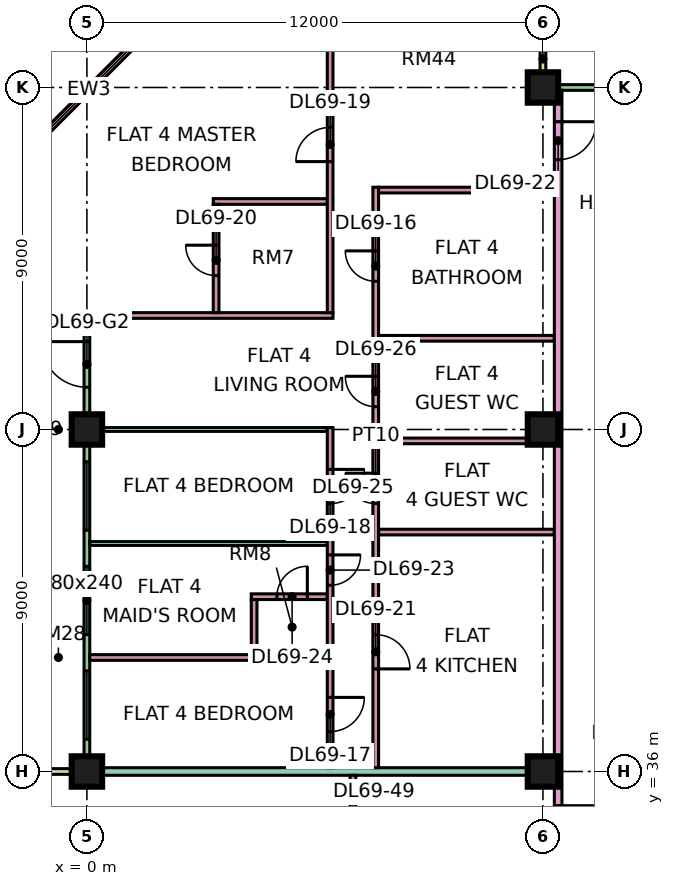
"""IFC4 building model, lengths in metres.
Left out: names, types, materials, properties, quantities, classifications, styles, units other than length and angle.
Written with IfcOpenShell. Run it as: python <this file> out.ifc"""

import sys

from ifc_helpers import new_model, si_unit, direction, frame, frame_2d, origin, origin_2d, place, context, subcontext, project, spatial, rectangle, extrude, element, fill, save


model = new_model("IFC4")
c1 = context("Model", 3, precision=1e-05, world=origin(), true_north=direction((0.0, 1.0)))
c2 = subcontext(c1, "Body", "Model", "MODEL_VIEW")
j1 = project(units=[si_unit("LENGTHUNIT", "METRE"), si_unit("PLANEANGLEUNIT", "RADIAN")], contexts=[c1])
p1 = place(None, origin())
s1 = spatial("IfcSite", under=j1, at=p1, CompositionType="ELEMENT")
p2 = place(p1, origin())
s2 = spatial("IfcBuilding", under=s1, at=p2, CompositionType="ELEMENT")
p3 = place(p2, frame((0.0, 0.0, 295.9)))
s3 = spatial("IfcBuildingStorey", under=s2, at=p3, CompositionType="ELEMENT", Elevation=295.9)
p4 = place(p3, frame((0.0, 36.0, 0.0), z_axis=(0.0, 0.0, 1.0), x_axis=(1.0, 0.0, 0.0)))
e1 = element("IfcColumn", 1, at=p4, inside=s3, PredefinedType="COLUMN", context=c2, shape_type="SweptSolid", body=[
    extrude(rectangle(XDim=0.8, YDim=0.8, at=origin_2d()), origin(), (0.0, 0.0, 1.0), 3.75),
])
for number, where, z_axis, x_axis in (
    (2, (0.0, 45.0, 0.0), (0.0, 0.0, 1.0), (1.0, 0.0, 0.0)),
    (3, (12.0, 36.0, 0.0), (0.0, 0.0, 1.0), (1.0, 0.0, 0.0)),
    (4, (12.0, 45.0, 0.0), (0.0, 0.0, 1.0), (1.0, 0.0, 0.0)),
    (5, (12.0, 54.0, 0.0), (0.0, 0.0, 1.0), (1.0, 0.0, 0.0)),
):
    element("IfcColumn", number, at=place(p3, frame(where, z_axis=z_axis, x_axis=x_axis)), inside=s3, PredefinedType="COLUMN", context=c2, shape_type="SweptSolid", body=[
        extrude(rectangle(XDim=0.8, YDim=0.8, at=origin_2d()), origin(), (0.0, 0.0, 1.0), 3.75),
    ])
p5 = place(p3, frame((22.425, 54.0, 0.0), z_axis=(0.0, 0.0, 1.0), x_axis=(-1.0, 0.0, 0.0)))
e6 = element("IfcWall", 6, at=p5, inside=s3, PredefinedType="SOLIDWALL", context=c2, shape_type="SweptSolid", body=[
    extrude(rectangle(XDim=10.35, YDim=0.15, at=frame_2d((5.175, 0.0))), origin(), (0.0, 0.0, 1.0), 3.35),
])
p6 = place(p5, frame((1.012, 0.0, 0.45)))
e7 = element("IfcOpeningElement", 7, at=p6, cuts=e6, PredefinedType="OPENING", context=c2, shape_type="SweptSolid", body=[
    extrude(rectangle(XDim=4.8, YDim=2.4, at=frame_2d((2.4, 1.2))), frame((0.0, 0.085, 0.0), z_axis=(0.0, -1.0, 0.0), x_axis=(1.0, 0.0, 0.0)), (0.0, 0.0, 1.0), 0.17),
])
p7 = place(p3, frame((12.0, 55.5, 0.0), z_axis=(0.0, 0.0, 1.0), x_axis=(0.0, -1.0, 0.0)))
e8 = element("IfcWall", 8, at=p7, inside=s3, PredefinedType="SOLIDWALL", context=c2, shape_type="SweptSolid", body=[
    extrude(rectangle(XDim=1.5, YDim=0.15, at=frame_2d((0.75, 0.0))), origin(), (0.0, 0.0, 1.0), 3.35),
])
p8 = place(p3, frame((1.553, 55.447, 0.0), z_axis=(0.0, 0.0, 1.0), x_axis=(-0.707106781187, -0.707106781187, 0.0)))
e9 = element("IfcWall", 9, at=p8, inside=s3, PredefinedType="SOLIDWALL", context=c2, shape_type="SweptSolid", body=[
    extrude(rectangle(XDim=4.243, YDim=0.15, at=frame_2d((2.121, 0.0))), origin(), (0.0, 0.0, 1.0), 3.35),
])
p9 = place(p8, frame((0.621, 0.0, 0.45)))
e10 = element("IfcOpeningElement", 10, at=p9, cuts=e9, PredefinedType="OPENING", context=c2, shape_type="SweptSolid", body=[
    extrude(rectangle(XDim=3.0, YDim=2.4, at=frame_2d((1.5, 1.2))), frame((0.0, 0.085, 0.0), z_axis=(0.0, -1.0, 0.0), x_axis=(1.0, 0.0, 0.0)), (0.0, 0.0, 1.0), 0.17),
])
p10 = place(p3, frame((0.0, 47.925, 0.0), z_axis=(0.0, 0.0, 1.0), x_axis=(0.0, -1.0, 0.0)))
e11 = element("IfcWall", 11, at=p10, inside=s3, PredefinedType="SOLIDWALL", context=c2, shape_type="SweptSolid", body=[
    extrude(rectangle(XDim=11.85, YDim=0.15, at=frame_2d((5.925, 0.0))), origin(), (0.0, 0.0, 1.0), 3.35),
])
p11 = place(p10, frame((0.613, 0.0, 0.0)))
e12 = element("IfcOpeningElement", 12, at=p11, cuts=e11, PredefinedType="OPENING", context=c2, shape_type="SweptSolid", body=[
    extrude(rectangle(XDim=1.2, YDim=2.4, at=frame_2d((0.6, 1.2))), frame((0.0, 0.085, 0.0), z_axis=(0.0, -1.0, 0.0), x_axis=(1.0, 0.0, 0.0)), (0.0, 0.0, 1.0), 0.17),
])
p12 = place(p10, frame((3.775, 0.0, 0.45)))
e13 = element("IfcOpeningElement", 13, at=p12, cuts=e11, PredefinedType="OPENING", context=c2, shape_type="SweptSolid", body=[
    extrude(rectangle(XDim=1.8, YDim=2.4, at=frame_2d((0.9, 1.2))), frame((0.0, 0.085, 0.0), z_axis=(0.0, -1.0, 0.0), x_axis=(1.0, 0.0, 0.0)), (0.0, 0.0, 1.0), 0.17),
])
p13 = place(p10, frame((6.525, 0.0, 0.45)))
e14 = element("IfcOpeningElement", 14, at=p13, cuts=e11, PredefinedType="OPENING", context=c2, shape_type="SweptSolid", body=[
    extrude(rectangle(XDim=1.8, YDim=2.4, at=frame_2d((0.9, 1.2))), frame((0.0, 0.085, 0.0), z_axis=(0.0, -1.0, 0.0), x_axis=(1.0, 0.0, 0.0)), (0.0, 0.0, 1.0), 0.17),
])
p14 = place(p10, frame((9.275, 0.0, 0.45)))
e15 = element("IfcOpeningElement", 15, at=p14, cuts=e11, PredefinedType="OPENING", context=c2, shape_type="SweptSolid", body=[
    extrude(rectangle(XDim=1.8, YDim=2.4, at=frame_2d((0.9, 1.2))), frame((0.0, 0.085, 0.0), z_axis=(0.0, -1.0, 0.0), x_axis=(1.0, 0.0, 0.0)), (0.0, 0.0, 1.0), 0.17),
])
for number, where, z_axis, x_axis in (
    (16, (-1.5, 48.0, 0.0), (0.0, 0.0, 1.0), (1.0, 0.0, 0.0)),
    (17, (-1.5, 36.0, 0.0), (0.0, 0.0, 1.0), (1.0, 0.0, 0.0)),
):
    element("IfcWall", number, at=place(p3, frame(where, z_axis=z_axis, x_axis=x_axis)), inside=s3, PredefinedType="SOLIDWALL", context=c2, shape_type="SweptSolid", body=[
        extrude(rectangle(XDim=1.5, YDim=0.15, at=frame_2d((0.75, 0.0))), origin(), (0.0, 0.0, 1.0), 3.35),
    ])
e18 = element("IfcWall", 18, at=p4, inside=s3, PredefinedType="PARTITIONING", context=c2, shape_type="SweptSolid", body=[
    extrude(rectangle(XDim=12.3, YDim=0.2, at=frame_2d((6.15, 0.0))), origin(), (0.0, 0.0, 1.0), 3.35),
])
p15 = place(p3, frame((0.0, 48.0, 0.0), z_axis=(0.0, 0.0, 1.0), x_axis=(1.0, 0.0, 0.0)))
e19 = element("IfcWall", 19, at=p15, inside=s3, PredefinedType="PARTITIONING", context=c2, shape_type="SweptSolid", body=[
    extrude(rectangle(XDim=6.475, YDim=0.15, at=frame_2d((3.238, 0.0))), origin(), (0.0, 0.0, 1.0), 3.35),
])
p16 = place(p3, frame((0.074, 39.0, 0.0), z_axis=(0.0, 0.0, 1.0), x_axis=(1.0, 0.0, 0.0)))
e20 = element("IfcWall", 20, at=p16, inside=s3, PredefinedType="PARTITIONING", context=c2, shape_type="SweptSolid", body=[
    extrude(rectangle(XDim=6.251, YDim=0.15, at=frame_2d((3.125, 0.0))), origin(), (0.0, 0.0, 1.0), 3.35),
])
for number, where, z_axis, x_axis in (
    (21, (0.074, 42.0, 0.0), (0.0, 0.0, 1.0), (1.0, 0.0, 0.0)),
    (22, (0.074, 45.0, 0.0), (0.0, 0.0, 1.0), (1.0, 0.0, 0.0)),
):
    element("IfcWall", number, at=place(p3, frame(where, z_axis=z_axis, x_axis=x_axis)), inside=s3, PredefinedType="PARTITIONING", context=c2, shape_type="SweptSolid", body=[
        extrude(rectangle(XDim=6.251, YDim=0.1, at=frame_2d((3.125, 0.0))), origin(), (0.0, 0.0, 1.0), 3.35),
    ])
p17 = place(p3, frame((3.325, 51.0, 0.0), z_axis=(0.0, 0.0, 1.0), x_axis=(1.0, 0.0, 0.0)))
e23 = element("IfcWall", 23, at=p17, inside=s3, PredefinedType="PARTITIONING", context=c2, shape_type="SweptSolid", body=[
    extrude(rectangle(XDim=3.0, YDim=0.15, at=frame_2d((1.5, 0.0))), origin(), (0.0, 0.0, 1.0), 3.35),
])
p18 = place(p3, frame((3.4, 48.075, 0.0), z_axis=(0.0, 0.0, 1.0), x_axis=(0.0, 1.0, 0.0)))
e24 = element("IfcWall", 24, at=p18, inside=s3, PredefinedType="PARTITIONING", context=c2, shape_type="SweptSolid", body=[
    extrude(rectangle(XDim=2.85, YDim=0.15, at=frame_2d((1.425, 0.0))), origin(), (0.0, 0.0, 1.0), 3.35),
])
p19 = place(p18, frame((0.975, 0.0, 0.0)))
e25 = element("IfcOpeningElement", 25, at=p19, cuts=e24, PredefinedType="OPENING", context=c2, shape_type="SweptSolid", body=[
    extrude(rectangle(XDim=0.8, YDim=2.1, at=frame_2d((0.4, 1.05))), frame((0.0, 0.085, 0.0), z_axis=(0.0, -1.0, 0.0), x_axis=(1.0, 0.0, 0.0)), (0.0, 0.0, 1.0), 0.17),
])
p20 = place(p3, frame((4.325, 40.6, 0.0), z_axis=(0.0, 0.0, 1.0), x_axis=(1.0, 0.0, 0.0)))
e26 = element("IfcWall", 26, at=p20, inside=s3, PredefinedType="PARTITIONING", context=c2, shape_type="SweptSolid", body=[
    extrude(rectangle(XDim=2.0, YDim=0.15, at=frame_2d((1.0, 0.0))), origin(), (0.0, 0.0, 1.0), 3.35),
])
p21 = place(p20, frame((0.675, 0.0, 0.0)))
e27 = element("IfcOpeningElement", 27, at=p21, cuts=e26, PredefinedType="OPENING", context=c2, shape_type="SweptSolid", body=[
    extrude(rectangle(XDim=0.8, YDim=2.1, at=frame_2d((0.4, 1.05))), frame((0.0, 0.085, 0.0), z_axis=(0.0, -1.0, 0.0), x_axis=(1.0, 0.0, 0.0)), (0.0, 0.0, 1.0), 0.17),
])
p22 = place(p3, frame((4.4, 39.075, 0.0), z_axis=(0.0, 0.0, 1.0), x_axis=(0.0, 1.0, 0.0)))
e28 = element("IfcWall", 28, at=p22, inside=s3, PredefinedType="PARTITIONING", context=c2, shape_type="SweptSolid", body=[
    extrude(rectangle(XDim=1.45, YDim=0.15, at=frame_2d((0.725, 0.0))), origin(), (0.0, 0.0, 1.0), 3.35),
])
p23 = place(p3, frame((6.4, 36.1, 0.0), z_axis=(0.0, 0.0, 1.0), x_axis=(0.0, 1.0, 0.0)))
e29 = element("IfcWall", 29, at=p23, inside=s3, PredefinedType="PARTITIONING", context=c2, shape_type="SweptSolid", body=[
    extrude(rectangle(XDim=8.95, YDim=0.15, at=frame_2d((4.475, 0.0))), origin(), (0.0, 0.0, 1.0), 3.35),
])
p24 = place(p23, frame((0.95, 0.0, 0.0)))
e30 = element("IfcOpeningElement", 30, at=p24, cuts=e29, PredefinedType="OPENING", context=c2, shape_type="SweptSolid", body=[
    extrude(rectangle(XDim=0.9, YDim=2.1, at=frame_2d((0.45, 1.05))), frame((0.0, 0.085, 0.0), z_axis=(0.0, -1.0, 0.0), x_axis=(1.0, 0.0, 0.0)), (0.0, 0.0, 1.0), 0.17),
])
p25 = place(p23, frame((6.95, 0.0, 0.0)))
e31 = element("IfcOpeningElement", 31, at=p25, cuts=e29, PredefinedType="OPENING", context=c2, shape_type="SweptSolid", body=[
    extrude(rectangle(XDim=0.9, YDim=2.1, at=frame_2d((0.45, 1.05))), frame((0.0, 0.085, 0.0), z_axis=(0.0, -1.0, 0.0), x_axis=(1.0, 0.0, 0.0)), (0.0, 0.0, 1.0), 0.17),
])
p26 = place(p23, frame((4.8, 0.0, 0.0)))
e32 = element("IfcOpeningElement", 32, at=p26, cuts=e29, PredefinedType="OPENING", context=c2, shape_type="SweptSolid", body=[
    extrude(rectangle(XDim=0.8, YDim=2.1, at=frame_2d((0.4, 1.05))), frame((0.0, 0.085, 0.0), z_axis=(0.0, -1.0, 0.0), x_axis=(1.0, 0.0, 0.0)), (0.0, 0.0, 1.0), 0.17),
])
p27 = place(p3, frame((6.4, 48.075, 0.0), z_axis=(0.0, 0.0, 1.0), x_axis=(0.0, 1.0, 0.0)))
e33 = element("IfcWall", 33, at=p27, inside=s3, PredefinedType="PARTITIONING", context=c2, shape_type="SweptSolid", body=[
    extrude(rectangle(XDim=7.275, YDim=0.15, at=frame_2d((3.638, 0.0))), origin(), (0.0, 0.0, 1.0), 3.35),
])
p28 = place(p27, frame((3.975, 0.0, 0.0)))
e34 = element("IfcOpeningElement", 34, at=p28, cuts=e33, PredefinedType="OPENING", context=c2, shape_type="SweptSolid", body=[
    extrude(rectangle(XDim=0.9, YDim=2.1, at=frame_2d((0.45, 1.05))), frame((0.0, 0.085, 0.0), z_axis=(0.0, -1.0, 0.0), x_axis=(1.0, 0.0, 0.0)), (0.0, 0.0, 1.0), 0.17),
])
p29 = place(p3, frame((7.0, 30.075, 0.0), z_axis=(0.0, 0.0, 1.0), x_axis=(0.0, 1.0, 0.0)))
e35 = element("IfcWall", 35, at=p29, inside=s3, PredefinedType="PARTITIONING", context=c2, shape_type="SweptSolid", body=[
    extrude(rectangle(XDim=5.825, YDim=0.15, at=frame_2d((2.913, 0.0))), origin(), (0.0, 0.0, 1.0), 3.35),
])
p30 = place(p29, frame((3.975, 0.0, 0.0)))
e36 = element("IfcOpeningElement", 36, at=p30, cuts=e35, PredefinedType="OPENING", context=c2, shape_type="SweptSolid", body=[
    extrude(rectangle(XDim=0.9, YDim=2.1, at=frame_2d((0.45, 1.05))), frame((0.0, 0.085, 0.0), z_axis=(0.0, -1.0, 0.0), x_axis=(1.0, 0.0, 0.0)), (0.0, 0.0, 1.0), 0.17),
])
p31 = place(p3, frame((7.6, 36.1, 0.0), z_axis=(0.0, 0.0, 1.0), x_axis=(0.0, 1.0, 0.0)))
e37 = element("IfcWall", 37, at=p31, inside=s3, PredefinedType="PARTITIONING", context=c2, shape_type="SweptSolid", body=[
    extrude(rectangle(XDim=15.275, YDim=0.15, at=frame_2d((7.637, 0.0))), origin(), (0.0, 0.0, 1.0), 3.35),
])
p32 = place(p31, frame((12.8, 0.0, 0.0)))
e38 = element("IfcOpeningElement", 38, at=p32, cuts=e37, PredefinedType="OPENING", context=c2, shape_type="SweptSolid", body=[
    extrude(rectangle(XDim=0.8, YDim=2.1, at=frame_2d((0.4, 1.05))), frame((0.0, 0.085, 0.0), z_axis=(0.0, -1.0, 0.0), x_axis=(1.0, 0.0, 0.0)), (0.0, 0.0, 1.0), 0.17),
])
p33 = place(p31, frame((2.6, 0.0, 0.0)))
e39 = element("IfcOpeningElement", 39, at=p33, cuts=e37, PredefinedType="OPENING", context=c2, shape_type="SweptSolid", body=[
    extrude(rectangle(XDim=0.9, YDim=2.1, at=frame_2d((0.45, 1.05))), frame((0.0, 0.085, 0.0), z_axis=(0.0, -1.0, 0.0), x_axis=(1.0, 0.0, 0.0)), (0.0, 0.0, 1.0), 0.17),
])
p34 = place(p31, frame((6.95, 0.0, 0.0)))
e40 = element("IfcOpeningElement", 40, at=p34, cuts=e37, PredefinedType="OPENING", context=c2, shape_type="SweptSolid", body=[
    extrude(rectangle(XDim=0.8, YDim=2.1, at=frame_2d((0.4, 1.05))), frame((0.0, 0.085, 0.0), z_axis=(0.0, -1.0, 0.0), x_axis=(1.0, 0.0, 0.0)), (0.0, 0.0, 1.0), 0.17),
])
p35 = place(p31, frame((9.5, 0.0, 0.0)))
e41 = element("IfcOpeningElement", 41, at=p35, cuts=e37, PredefinedType="OPENING", context=c2, shape_type="SweptSolid", body=[
    extrude(rectangle(XDim=0.8, YDim=2.1, at=frame_2d((0.4, 1.05))), frame((0.0, 0.085, 0.0), z_axis=(0.0, -1.0, 0.0), x_axis=(1.0, 0.0, 0.0)), (0.0, 0.0, 1.0), 0.17),
])
for number, where, z_axis, x_axis in (
    (42, (7.675, 42.3, 0.0), (0.0, 0.0, 1.0), (1.0, 0.0, 0.0)),
    (43, (7.675, 44.7, 0.0), (0.0, 0.0, 1.0), (1.0, 0.0, 0.0)),
    (44, (7.675, 47.4, 0.0), (0.0, 0.0, 1.0), (1.0, 0.0, 0.0)),
    (45, (7.675, 51.3, 0.0), (0.0, 0.0, 1.0), (1.0, 0.0, 0.0)),
):
    element("IfcWall", number, at=place(p3, frame(where, z_axis=z_axis, x_axis=x_axis)), inside=s3, PredefinedType="PARTITIONING", context=c2, shape_type="SweptSolid", body=[
        extrude(rectangle(XDim=4.625, YDim=0.15, at=frame_2d((2.312, 0.0))), origin(), (0.0, 0.0, 1.0), 3.35),
    ])
p36 = place(p3, frame((12.4, 20.0, 0.0), z_axis=(0.0, 0.0, 1.0), x_axis=(0.0, 1.0, 0.0)))
e46 = element("IfcWall", 46, at=p36, inside=s3, PredefinedType="PARTITIONING", context=c2, shape_type="SweptSolid", body=[
    extrude(rectangle(XDim=33.926, YDim=0.2, at=frame_2d((16.963, 0.0))), origin(), (0.0, 0.0, 1.0), 3.35),
])
p37 = place(p36, frame((32.1, 0.0, 0.0)))
e47 = element("IfcOpeningElement", 47, at=p37, cuts=e46, PredefinedType="OPENING", context=c2, shape_type="SweptSolid", body=[
    extrude(rectangle(XDim=1.0, YDim=2.1, at=frame_2d((0.5, 1.05))), frame((0.0, 0.11, 0.0), z_axis=(0.0, -1.0, 0.0), x_axis=(1.0, 0.0, 0.0)), (0.0, 0.0, 1.0), 0.22),
])
p38 = place(p36, frame((0.6, 0.0, 0.0)))
e48 = element("IfcOpeningElement", 48, at=p38, cuts=e46, PredefinedType="OPENING", context=c2, shape_type="SweptSolid", body=[
    extrude(rectangle(XDim=1.2, YDim=2.1, at=frame_2d((0.6, 1.05))), frame((0.0, 0.11, 0.0), z_axis=(0.0, -1.0, 0.0), x_axis=(1.0, 0.0, 0.0)), (0.0, 0.0, 1.0), 0.22),
])
p39 = place(p36, frame((14.1, 0.0, 0.0)))
e49 = element("IfcOpeningElement", 49, at=p39, cuts=e46, PredefinedType="OPENING", context=c2, shape_type="SweptSolid", body=[
    extrude(rectangle(XDim=1.0, YDim=2.1, at=frame_2d((0.5, 1.05))), frame((0.0, 0.11, 0.0), z_axis=(0.0, -1.0, 0.0), x_axis=(1.0, 0.0, 0.0)), (0.0, 0.0, 1.0), 0.22),
])
p40 = place(p9, origin())
e50 = element("IfcWindow", 50, at=p40, inside=s3, PartitioningType="SINGLE_PANEL", PredefinedType="WINDOW", context=c2, shape_type="SweptSolid", body=[
    extrude(rectangle(XDim=3.0, YDim=2.4, at=frame_2d((1.5, 1.2))), frame((0.0, 0.03, 0.0), z_axis=(0.0, -1.0, 0.0), x_axis=(1.0, 0.0, 0.0)), (0.0, 0.0, 1.0), 0.06),
])
fill(e10, e50)
p41 = place(p11, frame((1.2, 0.0, 0.0), z_axis=(0.0, 0.0, 1.0), x_axis=(-1.0, 0.0, 0.0)))
e51 = element("IfcDoor", 51, at=p41, inside=s3, OperationType="DOUBLE_DOOR_SINGLE_SWING", PredefinedType="DOOR", context=c2, shape_type="SweptSolid", body=[
    extrude(rectangle(XDim=1.2, YDim=2.4, at=frame_2d((0.6, 1.2))), frame((0.0, 0.025, 0.0), z_axis=(0.0, -1.0, 0.0), x_axis=(1.0, 0.0, 0.0)), (0.0, 0.0, 1.0), 0.05),
])
fill(e12, e51)
p42 = place(p12, origin())
e52 = element("IfcWindow", 52, at=p42, inside=s3, PartitioningType="SINGLE_PANEL", PredefinedType="WINDOW", context=c2, shape_type="SweptSolid", body=[
    extrude(rectangle(XDim=1.8, YDim=2.4, at=frame_2d((0.9, 1.2))), frame((0.0, 0.03, 0.0), z_axis=(0.0, -1.0, 0.0), x_axis=(1.0, 0.0, 0.0)), (0.0, 0.0, 1.0), 0.06),
])
fill(e13, e52)
p43 = place(p13, origin())
e53 = element("IfcWindow", 53, at=p43, inside=s3, PartitioningType="SINGLE_PANEL", PredefinedType="WINDOW", context=c2, shape_type="SweptSolid", body=[
    extrude(rectangle(XDim=1.8, YDim=2.4, at=frame_2d((0.9, 1.2))), frame((0.0, 0.03, 0.0), z_axis=(0.0, -1.0, 0.0), x_axis=(1.0, 0.0, 0.0)), (0.0, 0.0, 1.0), 0.06),
])
fill(e14, e53)
p44 = place(p14, origin())
e54 = element("IfcWindow", 54, at=p44, inside=s3, PartitioningType="SINGLE_PANEL", PredefinedType="WINDOW", context=c2, shape_type="SweptSolid", body=[
    extrude(rectangle(XDim=1.8, YDim=2.4, at=frame_2d((0.9, 1.2))), frame((0.0, 0.03, 0.0), z_axis=(0.0, -1.0, 0.0), x_axis=(1.0, 0.0, 0.0)), (0.0, 0.0, 1.0), 0.06),
])
fill(e15, e54)
p45 = place(p32, frame((0.8, 0.0, 0.0), z_axis=(0.0, 0.0, 1.0), x_axis=(-1.0, 0.0, 0.0)))
e55 = element("IfcDoor", 55, at=p45, inside=s3, OperationType="SINGLE_SWING_RIGHT", PredefinedType="DOOR", context=c2, shape_type="SweptSolid", body=[
    extrude(rectangle(XDim=0.8, YDim=2.1, at=frame_2d((0.4, 1.05))), frame((0.0, 0.025, 0.0), z_axis=(0.0, -1.0, 0.0), x_axis=(1.0, 0.0, 0.0)), (0.0, 0.0, 1.0), 0.05),
])
fill(e38, e55)
p46 = place(p24, origin())
e56 = element("IfcDoor", 56, at=p46, inside=s3, OperationType="SINGLE_SWING_RIGHT", PredefinedType="DOOR", context=c2, shape_type="SweptSolid", body=[
    extrude(rectangle(XDim=0.9, YDim=2.1, at=frame_2d((0.45, 1.05))), frame((0.0, 0.025, 0.0), z_axis=(0.0, -1.0, 0.0), x_axis=(1.0, 0.0, 0.0)), (0.0, 0.0, 1.0), 0.05),
])
fill(e30, e56)
p47 = place(p25, origin())
e57 = element("IfcDoor", 57, at=p47, inside=s3, OperationType="SINGLE_SWING_RIGHT", PredefinedType="DOOR", context=c2, shape_type="SweptSolid", body=[
    extrude(rectangle(XDim=0.9, YDim=2.1, at=frame_2d((0.45, 1.05))), frame((0.0, 0.025, 0.0), z_axis=(0.0, -1.0, 0.0), x_axis=(1.0, 0.0, 0.0)), (0.0, 0.0, 1.0), 0.05),
])
fill(e31, e57)
p48 = place(p28, origin())
e58 = element("IfcDoor", 58, at=p48, inside=s3, OperationType="SINGLE_SWING_LEFT", PredefinedType="DOOR", context=c2, shape_type="SweptSolid", body=[
    extrude(rectangle(XDim=0.9, YDim=2.1, at=frame_2d((0.45, 1.05))), frame((0.0, 0.025, 0.0), z_axis=(0.0, -1.0, 0.0), x_axis=(1.0, 0.0, 0.0)), (0.0, 0.0, 1.0), 0.05),
])
fill(e34, e58)
p49 = place(p19, frame((0.8, 0.0, 0.0), z_axis=(0.0, 0.0, 1.0), x_axis=(-1.0, 0.0, 0.0)))
e59 = element("IfcDoor", 59, at=p49, inside=s3, OperationType="SINGLE_SWING_RIGHT", PredefinedType="DOOR", context=c2, shape_type="SweptSolid", body=[
    extrude(rectangle(XDim=0.8, YDim=2.1, at=frame_2d((0.4, 1.05))), frame((0.0, 0.025, 0.0), z_axis=(0.0, -1.0, 0.0), x_axis=(1.0, 0.0, 0.0)), (0.0, 0.0, 1.0), 0.05),
])
fill(e25, e59)
p50 = place(p33, frame((0.9, 0.0, 0.0), z_axis=(0.0, 0.0, 1.0), x_axis=(-1.0, 0.0, 0.0)))
e60 = element("IfcDoor", 60, at=p50, inside=s3, OperationType="SINGLE_SWING_LEFT", PredefinedType="DOOR", context=c2, shape_type="SweptSolid", body=[
    extrude(rectangle(XDim=0.9, YDim=2.1, at=frame_2d((0.45, 1.05))), frame((0.0, 0.025, 0.0), z_axis=(0.0, -1.0, 0.0), x_axis=(1.0, 0.0, 0.0)), (0.0, 0.0, 1.0), 0.05),
])
fill(e39, e60)
p51 = place(p37, origin())
e61 = element("IfcDoor", 61, at=p51, inside=s3, OperationType="SINGLE_SWING_RIGHT", PredefinedType="DOOR", context=c2, shape_type="SweptSolid", body=[
    extrude(rectangle(XDim=1.0, YDim=2.1, at=frame_2d((0.5, 1.05))), frame((0.0, 0.025, 0.0), z_axis=(0.0, -1.0, 0.0), x_axis=(1.0, 0.0, 0.0)), (0.0, 0.0, 1.0), 0.05),
])
fill(e47, e61)
p52 = place(p26, origin())
e62 = element("IfcDoor", 62, at=p52, inside=s3, OperationType="SINGLE_SWING_RIGHT", PredefinedType="DOOR", context=c2, shape_type="SweptSolid", body=[
    extrude(rectangle(XDim=0.8, YDim=2.1, at=frame_2d((0.4, 1.05))), frame((0.0, 0.025, 0.0), z_axis=(0.0, -1.0, 0.0), x_axis=(1.0, 0.0, 0.0)), (0.0, 0.0, 1.0), 0.05),
])
fill(e32, e62)
p53 = place(p21, frame((0.8, 0.0, 0.0), z_axis=(0.0, 0.0, 1.0), x_axis=(-1.0, 0.0, 0.0)))
e63 = element("IfcDoor", 63, at=p53, inside=s3, OperationType="SINGLE_SWING_RIGHT", PredefinedType="DOOR", context=c2, shape_type="SweptSolid", body=[
    extrude(rectangle(XDim=0.8, YDim=2.1, at=frame_2d((0.4, 1.05))), frame((0.0, 0.025, 0.0), z_axis=(0.0, -1.0, 0.0), x_axis=(1.0, 0.0, 0.0)), (0.0, 0.0, 1.0), 0.05),
])
fill(e27, e63)
p54 = place(p34, frame((0.8, 0.0, 0.0), z_axis=(0.0, 0.0, 1.0), x_axis=(-1.0, 0.0, 0.0)))
e64 = element("IfcDoor", 64, at=p54, inside=s3, OperationType="SINGLE_SWING_RIGHT", PredefinedType="DOOR", context=c2, shape_type="SweptSolid", body=[
    extrude(rectangle(XDim=0.8, YDim=2.1, at=frame_2d((0.4, 1.05))), frame((0.0, 0.025, 0.0), z_axis=(0.0, -1.0, 0.0), x_axis=(1.0, 0.0, 0.0)), (0.0, 0.0, 1.0), 0.05),
])
fill(e40, e64)
p55 = place(p35, frame((0.8, 0.0, 0.0), z_axis=(0.0, 0.0, 1.0), x_axis=(-1.0, 0.0, 0.0)))
e65 = element("IfcDoor", 65, at=p55, inside=s3, OperationType="SINGLE_SWING_RIGHT", PredefinedType="DOOR", context=c2, shape_type="SweptSolid", body=[
    extrude(rectangle(XDim=0.8, YDim=2.1, at=frame_2d((0.4, 1.05))), frame((0.0, 0.025, 0.0), z_axis=(0.0, -1.0, 0.0), x_axis=(1.0, 0.0, 0.0)), (0.0, 0.0, 1.0), 0.05),
])
fill(e41, e65)
p56 = place(p39, origin())
e66 = element("IfcDoor", 66, at=p56, inside=s3, OperationType="SINGLE_SWING_RIGHT", PredefinedType="DOOR", context=c2, shape_type="SweptSolid", body=[
    extrude(rectangle(XDim=1.0, YDim=2.1, at=frame_2d((0.5, 1.05))), frame((0.0, 0.025, 0.0), z_axis=(0.0, -1.0, 0.0), x_axis=(1.0, 0.0, 0.0)), (0.0, 0.0, 1.0), 0.05),
])
fill(e49, e66)
save(model, sys.argv[1])
